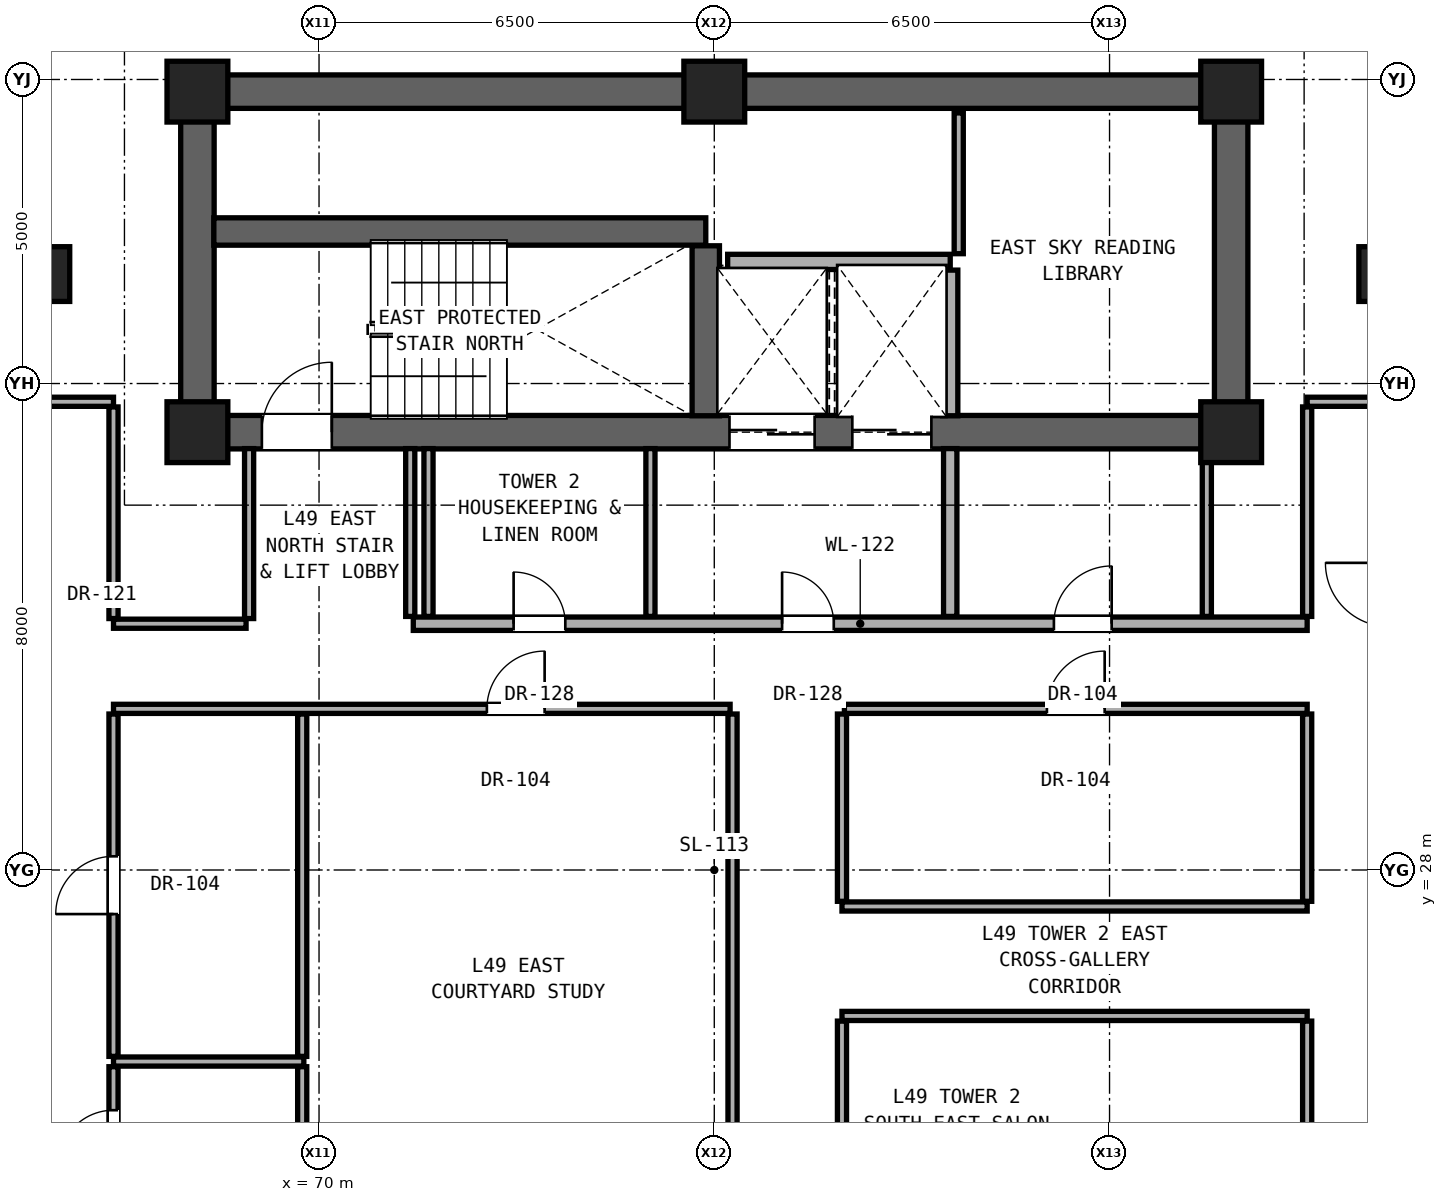
"""IFC4 building model, lengths in metres.
Left out: names, types, materials, properties, quantities, classifications, styles, units other than length and angle.
Written with IfcOpenShell. Run it as: python <this file> out.ifc"""

import sys

from ifc_helpers import new_model, si_unit, direction, frame, frame_2d, origin, origin_2d, place, context, subcontext, project, spatial, rectangle, extrude, element, fill, save


model = new_model("IFC4")
c1 = context("Model", 3, precision=1e-05, world=origin(), true_north=direction((0.0, 1.0)))
c2 = subcontext(c1, "Body", "Model", "MODEL_VIEW")
j1 = project(units=[si_unit("LENGTHUNIT", "METRE"), si_unit("PLANEANGLEUNIT", "RADIAN")], contexts=[c1])
p1 = place(None, origin())
s1 = spatial("IfcSite", under=j1, at=p1, CompositionType="ELEMENT")
p2 = place(p1, origin())
s2 = spatial("IfcBuilding", under=s1, at=p2, CompositionType="ELEMENT")
p3 = place(p2, frame((0.0, 0.0, 173.9)))
s3 = spatial("IfcBuildingStorey", under=s2, at=p3, CompositionType="ELEMENT", Elevation=173.9)
for number, where, z_axis, x_axis in (
    (1, (68.0, 35.2, 0.0), (0.0, 0.0, 1.0), (1.0, 0.0, 0.0)),
    (2, (85.0, 35.2, 0.0), (0.0, 0.0, 1.0), (1.0, 0.0, 0.0)),
    (3, (68.0, 40.8, 0.0), (0.0, 0.0, 1.0), (1.0, 0.0, 0.0)),
    (4, (76.5, 40.8, 0.0), (0.0, 0.0, 1.0), (1.0, 0.0, 0.0)),
    (5, (85.0, 40.8, 0.0), (0.0, 0.0, 1.0), (1.0, 0.0, 0.0)),
):
    element("IfcColumn", number, at=place(p3, frame(where, z_axis=z_axis, x_axis=x_axis)), inside=s3, PredefinedType="COLUMN", context=c2, shape_type="SweptSolid", body=[
        extrude(rectangle(XDim=1.0, YDim=1.0, at=origin_2d()), origin(), (0.0, 0.0, 1.0), 3.25),
    ])
for number, where, z_axis, x_axis in (
    (6, (65.6, 37.8, 0.0), (0.0, 0.0, 1.0), (1.0, 0.0, 0.0)),
    (7, (87.4, 37.8, 0.0), (0.0, 0.0, 1.0), (1.0, 0.0, 0.0)),
):
    element("IfcColumn", number, at=place(p3, frame(where, z_axis=z_axis, x_axis=x_axis)), inside=s3, PredefinedType="PILASTER", context=c2, shape_type="SweptSolid", body=[
        extrude(rectangle(XDim=0.6, YDim=0.9, at=origin_2d()), origin(), (0.0, 0.0, 1.0), 3.25),
    ])
p4 = place(p3, frame((68.0, 40.8, 0.0), z_axis=(0.0, 0.0, 1.0), x_axis=(1.0, 0.0, 0.0)))
e8 = element("IfcWall", 8, at=p4, inside=s3, PredefinedType="SHEAR", context=c2, shape_type="SweptSolid", body=[
    extrude(rectangle(XDim=17.0, YDim=0.55, at=frame_2d((8.5, 0.0))), origin(), (0.0, 0.0, 1.0), 3.05),
])
for number, where, z_axis, x_axis in (
    (9, (68.0, 35.2, 0.0), (0.0, 0.0, 1.0), (0.0, 1.0, 0.0)),
    (10, (85.0, 35.2, 0.0), (0.0, 0.0, 1.0), (0.0, 1.0, 0.0)),
):
    element("IfcWall", number, at=place(p3, frame(where, z_axis=z_axis, x_axis=x_axis)), inside=s3, PredefinedType="SHEAR", context=c2, shape_type="SweptSolid", body=[
        extrude(rectangle(XDim=5.6, YDim=0.55, at=frame_2d((2.8, 0.0))), origin(), (0.0, 0.0, 1.0), 3.05),
    ])
p5 = place(p3, frame((68.0, 35.2, 0.0), z_axis=(0.0, 0.0, 1.0), x_axis=(1.0, 0.0, 0.0)))
e11 = element("IfcWall", 11, at=p5, inside=s3, PredefinedType="SHEAR", context=c2, shape_type="SweptSolid", body=[
    extrude(rectangle(XDim=17.0, YDim=0.55, at=frame_2d((8.5, 0.0))), origin(), (0.0, 0.0, 1.0), 3.05),
])
p6 = place(p5, frame((1.06, 0.0, 0.0)))
e12 = element("IfcOpeningElement", 12, at=p6, cuts=e11, PredefinedType="OPENING", context=c2, shape_type="SweptSolid", body=[
    extrude(rectangle(XDim=1.15, YDim=2.2, at=frame_2d((0.575, 1.1))), frame((0.0, 0.285, 0.0), z_axis=(0.0, -1.0, 0.0), x_axis=(1.0, 0.0, 0.0)), (0.0, 0.0, 1.0), 0.57),
])
p7 = place(p5, frame((8.75, 0.0, 0.0)))
e13 = element("IfcOpeningElement", 13, at=p7, cuts=e11, PredefinedType="OPENING", context=c2, shape_type="SweptSolid", body=[
    extrude(rectangle(XDim=1.4, YDim=2.35, at=frame_2d((0.7, 1.175))), frame((0.0, 0.285, 0.0), z_axis=(0.0, -1.0, 0.0), x_axis=(1.0, 0.0, 0.0)), (0.0, 0.0, 1.0), 0.57),
])
p8 = place(p5, frame((10.77, 0.0, 0.0)))
e14 = element("IfcOpeningElement", 14, at=p8, cuts=e11, PredefinedType="OPENING", context=c2, shape_type="SweptSolid", body=[
    extrude(rectangle(XDim=1.3, YDim=2.3, at=frame_2d((0.65, 1.15))), frame((0.0, 0.285, 0.0), z_axis=(0.0, -1.0, 0.0), x_axis=(1.0, 0.0, 0.0)), (0.0, 0.0, 1.0), 0.57),
])
p9 = place(p3, frame((66.62, 24.85, 0.0), z_axis=(0.0, 0.0, 1.0), x_axis=(1.0, 0.0, 0.0)))
e15 = element("IfcWall", 15, at=p9, inside=s3, PredefinedType="PARTITIONING", context=c2, shape_type="SweptSolid", body=[
    extrude(rectangle(XDim=3.13, YDim=0.15, at=frame_2d((1.565, 0.0))), origin(), (0.0, 0.0, 1.0), 2.186),
])
for number, where, z_axis, x_axis in (
    (16, (78.6, 25.6, 0.0), (0.0, 0.0, 1.0), (1.0, 0.0, 0.0)),
    (17, (78.6, 27.4, 0.0), (0.0, 0.0, 1.0), (1.0, 0.0, 0.0)),
):
    element("IfcWall", number, at=place(p3, frame(where, z_axis=z_axis, x_axis=x_axis)), inside=s3, PredefinedType="PARTITIONING", context=c2, shape_type="SweptSolid", body=[
        extrude(rectangle(XDim=7.65, YDim=0.15, at=frame_2d((3.825, 0.0))), origin(), (0.0, 0.0, 1.0), 2.186),
    ])
p10 = place(p3, frame((66.62, 30.65, 0.0), z_axis=(0.0, 0.0, 1.0), x_axis=(1.0, 0.0, 0.0)))
e18 = element("IfcWall", 18, at=p10, inside=s3, PredefinedType="PARTITIONING", context=c2, shape_type="SweptSolid", body=[
    extrude(rectangle(XDim=10.14, YDim=0.15, at=frame_2d((5.07, 0.0))), origin(), (0.0, 0.0, 1.0), 2.186),
])
p11 = place(p10, frame((6.14, 0.0, 0.0)))
e19 = element("IfcOpeningElement", 19, at=p11, cuts=e18, PredefinedType="OPENING", context=c2, shape_type="SweptSolid", body=[
    extrude(rectangle(XDim=0.95, YDim=2.15, at=frame_2d((0.475, 1.075))), frame((0.0, 0.085, 0.0), z_axis=(0.0, -1.0, 0.0), x_axis=(1.0, 0.0, 0.0)), (0.0, 0.0, 1.0), 0.17),
])
p12 = place(p3, frame((78.64, 30.65, 0.0), z_axis=(0.0, 0.0, 1.0), x_axis=(1.0, 0.0, 0.0)))
e20 = element("IfcWall", 20, at=p12, inside=s3, PredefinedType="PARTITIONING", context=c2, shape_type="SweptSolid", body=[
    extrude(rectangle(XDim=7.61, YDim=0.15, at=frame_2d((3.805, 0.0))), origin(), (0.0, 0.0, 1.0), 2.186),
])
p13 = place(p12, frame((3.33, 0.0, 0.0)))
e21 = element("IfcOpeningElement", 21, at=p13, cuts=e20, PredefinedType="OPENING", context=c2, shape_type="SweptSolid", body=[
    extrude(rectangle(XDim=0.95, YDim=2.15, at=frame_2d((0.475, 1.075))), frame((0.0, 0.085, 0.0), z_axis=(0.0, -1.0, 0.0), x_axis=(1.0, 0.0, 0.0)), (0.0, 0.0, 1.0), 0.17),
])
p14 = place(p3, frame((66.62, 32.05, 0.0), z_axis=(0.0, 0.0, 1.0), x_axis=(1.0, 0.0, 0.0)))
e22 = element("IfcWall", 22, at=p14, inside=s3, PredefinedType="PARTITIONING", context=c2, shape_type="SweptSolid", body=[
    extrude(rectangle(XDim=2.18, YDim=0.15, at=frame_2d((1.09, 0.0))), origin(), (0.0, 0.0, 1.0), 2.186),
])
p15 = place(p3, frame((71.55, 32.05, 0.0), z_axis=(0.0, 0.0, 1.0), x_axis=(1.0, 0.0, 0.0)))
e23 = element("IfcWall", 23, at=p15, inside=s3, PredefinedType="SOLIDWALL", context=c2, shape_type="SweptSolid", body=[
    extrude(rectangle(XDim=14.7, YDim=0.22, at=frame_2d((7.35, 0.0))), origin(), (0.0, 0.0, 1.0), 2.186),
])
p16 = place(p15, frame((6.065, 0.0, 0.0)))
e24 = element("IfcOpeningElement", 24, at=p16, cuts=e23, PredefinedType="OPENING", context=c2, shape_type="SweptSolid", body=[
    extrude(rectangle(XDim=0.85, YDim=2.01, at=frame_2d((0.425, 1.005))), frame((0.0, 0.12, 0.0), z_axis=(0.0, -1.0, 0.0), x_axis=(1.0, 0.0, 0.0)), (0.0, 0.0, 1.0), 0.24),
])
p17 = place(p15, frame((10.535, 0.0, 0.0)))
e25 = element("IfcOpeningElement", 25, at=p17, cuts=e23, PredefinedType="OPENING", context=c2, shape_type="SweptSolid", body=[
    extrude(rectangle(XDim=0.95, YDim=2.15, at=frame_2d((0.475, 1.075))), frame((0.0, 0.12, 0.0), z_axis=(0.0, -1.0, 0.0), x_axis=(1.0, 0.0, 0.0)), (0.0, 0.0, 1.0), 0.24),
])
p18 = place(p15, frame((1.65, 0.0, 0.0)))
e26 = element("IfcOpeningElement", 26, at=p18, cuts=e23, PredefinedType="OPENING", context=c2, shape_type="SweptSolid", body=[
    extrude(rectangle(XDim=0.85, YDim=2.01, at=frame_2d((0.425, 1.005))), frame((0.0, 0.12, 0.0), z_axis=(0.0, -1.0, 0.0), x_axis=(1.0, 0.0, 0.0)), (0.0, 0.0, 1.0), 0.24),
])
p19 = place(p3, frame((65.25, 35.7, 0.0), z_axis=(0.0, 0.0, 1.0), x_axis=(1.0, 0.0, 0.0)))
e27 = element("IfcWall", 27, at=p19, inside=s3, PredefinedType="PARTITIONING", context=c2, shape_type="SweptSolid", body=[
    extrude(rectangle(XDim=1.37, YDim=0.15, at=frame_2d((0.685, 0.0))), origin(), (0.0, 0.0, 1.0), 3.05),
])
p20 = place(p3, frame((86.25, 35.7, 0.0), z_axis=(0.0, 0.0, 1.0), x_axis=(1.0, 0.0, 0.0)))
e28 = element("IfcWall", 28, at=p20, inside=s3, PredefinedType="PARTITIONING", context=c2, shape_type="SweptSolid", body=[
    extrude(rectangle(XDim=1.35, YDim=0.15, at=frame_2d((0.675, 0.0))), origin(), (0.0, 0.0, 1.0), 3.05),
])
p21 = place(p3, frame((76.72, 38.0, 0.0), z_axis=(0.0, 0.0, 1.0), x_axis=(1.0, 0.0, 0.0)))
e29 = element("IfcWall", 29, at=p21, inside=s3, PredefinedType="SOLIDWALL", context=c2, shape_type="SweptSolid", body=[
    extrude(rectangle(XDim=3.66, YDim=0.25, at=frame_2d((1.83, 0.0))), origin(), (0.0, 0.0, 1.0), 3.05),
])
p22 = place(p3, frame((68.27, 38.5, 0.0), z_axis=(0.0, 0.0, 1.0), x_axis=(1.0, 0.0, 0.0)))
e30 = element("IfcWall", 30, at=p22, inside=s3, PredefinedType="SHEAR", context=c2, shape_type="SweptSolid", body=[
    extrude(rectangle(XDim=8.09, YDim=0.45, at=frame_2d((4.045, 0.0))), origin(), (0.0, 0.0, 1.0), 3.05),
])
p23 = place(p3, frame((66.62, 22.435, 0.0), z_axis=(0.0, 0.0, 1.0), x_axis=(0.0, 1.0, 0.0)))
e31 = element("IfcWall", 31, at=p23, inside=s3, PredefinedType="PARTITIONING", context=c2, shape_type="SweptSolid", body=[
    extrude(rectangle(XDim=2.33, YDim=0.15, at=frame_2d((1.165, 0.0))), origin(), (0.0, 0.0, 1.0), 3.05),
])
p24 = place(p23, frame((0.715, 0.0, 0.0)))
e32 = element("IfcOpeningElement", 32, at=p24, cuts=e31, PredefinedType="OPENING", context=c2, shape_type="SweptSolid", body=[
    extrude(rectangle(XDim=0.9, YDim=2.1, at=frame_2d((0.45, 1.05))), frame((0.0, 0.085, 0.0), z_axis=(0.0, -1.0, 0.0), x_axis=(1.0, 0.0, 0.0)), (0.0, 0.0, 1.0), 0.17),
])
p25 = place(p3, frame((66.62, 24.935, 0.0), z_axis=(0.0, 0.0, 1.0), x_axis=(0.0, 1.0, 0.0)))
e33 = element("IfcWall", 33, at=p25, inside=s3, PredefinedType="PARTITIONING", context=c2, shape_type="SweptSolid", body=[
    extrude(rectangle(XDim=5.63, YDim=0.15, at=frame_2d((2.815, 0.0))), origin(), (0.0, 0.0, 1.0), 2.346),
])
p26 = place(p25, frame((2.34, 0.0, 0.0)))
e34 = element("IfcOpeningElement", 34, at=p26, cuts=e33, PredefinedType="OPENING", context=c2, shape_type="SweptSolid", body=[
    extrude(rectangle(XDim=0.95, YDim=2.15, at=frame_2d((0.475, 1.075))), frame((0.0, 0.085, 0.0), z_axis=(0.0, -1.0, 0.0), x_axis=(1.0, 0.0, 0.0)), (0.0, 0.0, 1.0), 0.17),
])
p27 = place(p3, frame((66.62, 32.135, 0.0), z_axis=(0.0, 0.0, 1.0), x_axis=(0.0, 1.0, 0.0)))
e35 = element("IfcWall", 35, at=p27, inside=s3, PredefinedType="PARTITIONING", context=c2, shape_type="SweptSolid", body=[
    extrude(rectangle(XDim=3.48, YDim=0.15, at=frame_2d((1.74, 0.0))), origin(), (0.0, 0.0, 1.0), 2.442),
])
p28 = place(p3, frame((68.85, 32.135, 0.0), z_axis=(0.0, 0.0, 1.0), x_axis=(0.0, 1.0, 0.0)))
e36 = element("IfcWall", 36, at=p28, inside=s3, PredefinedType="PARTITIONING", context=c2, shape_type="SweptSolid", body=[
    extrude(rectangle(XDim=2.795, YDim=0.15, at=frame_2d((1.397, 0.0))), origin(), (0.0, 0.0, 1.0), 3.05),
])
p29 = place(p3, frame((69.723, 22.435, 0.0), z_axis=(0.0, 0.0, 1.0), x_axis=(0.0, 1.0, 0.0)))
e37 = element("IfcWall", 37, at=p29, inside=s3, PredefinedType="PARTITIONING", context=c2, shape_type="SweptSolid", body=[
    extrude(rectangle(XDim=2.33, YDim=0.15, at=frame_2d((1.165, 0.0))), origin(), (0.0, 0.0, 1.0), 3.05),
])
p30 = place(p3, frame((69.723, 24.935, 0.0), z_axis=(0.0, 0.0, 1.0), x_axis=(0.0, 1.0, 0.0)))
e38 = element("IfcWall", 38, at=p30, inside=s3, PredefinedType="PARTITIONING", context=c2, shape_type="SweptSolid", body=[
    extrude(rectangle(XDim=5.63, YDim=0.15, at=frame_2d((2.815, 0.0))), origin(), (0.0, 0.0, 1.0), 2.186),
])
for number, where, z_axis, x_axis in (
    (39, (71.5, 32.17, 0.0), (0.0, 0.0, 1.0), (0.0, 1.0, 0.0)),
    (40, (71.8, 32.17, 0.0), (0.0, 0.0, 1.0), (0.0, 1.0, 0.0)),
    (41, (75.45, 32.17, 0.0), (0.0, 0.0, 1.0), (0.0, 1.0, 0.0)),
):
    element("IfcWall", number, at=place(p3, frame(where, z_axis=z_axis, x_axis=x_axis)), inside=s3, PredefinedType="PARTITIONING", context=c2, shape_type="SweptSolid", body=[
        extrude(rectangle(XDim=2.76, YDim=0.15, at=frame_2d((1.38, 0.0))), origin(), (0.0, 0.0, 1.0), 3.05),
    ])
p31 = place(p3, frame((76.36, 35.47, 0.0), z_axis=(0.0, 0.0, 1.0), x_axis=(0.0, 1.0, 0.0)))
e42 = element("IfcWall", 42, at=p31, inside=s3, PredefinedType="SHEAR", context=c2, shape_type="SweptSolid", body=[
    extrude(rectangle(XDim=2.795, YDim=0.45, at=frame_2d((1.397, 0.0))), origin(), (0.0, 0.0, 1.0), 3.05),
])
p32 = place(p3, frame((76.8, 22.435, 0.0), z_axis=(0.0, 0.0, 1.0), x_axis=(0.0, 1.0, 0.0)))
e43 = element("IfcWall", 43, at=p32, inside=s3, PredefinedType="PARTITIONING", context=c2, shape_type="SweptSolid", body=[
    extrude(rectangle(XDim=8.13, YDim=0.15, at=frame_2d((4.065, 0.0))), origin(), (0.0, 0.0, 1.0), 2.186),
])
p33 = place(p3, frame((78.6, 22.435, 0.0), z_axis=(0.0, 0.0, 1.0), x_axis=(0.0, 1.0, 0.0)))
e44 = element("IfcWall", 44, at=p33, inside=s3, PredefinedType="PARTITIONING", context=c2, shape_type="SweptSolid", body=[
    extrude(rectangle(XDim=3.08, YDim=0.15, at=frame_2d((1.54, 0.0))), origin(), (0.0, 0.0, 1.0), 3.05),
])
p34 = place(p3, frame((78.6, 27.485, 0.0), z_axis=(0.0, 0.0, 1.0), x_axis=(0.0, 1.0, 0.0)))
e45 = element("IfcWall", 45, at=p34, inside=s3, PredefinedType="PARTITIONING", context=c2, shape_type="SweptSolid", body=[
    extrude(rectangle(XDim=3.08, YDim=0.15, at=frame_2d((1.54, 0.0))), origin(), (0.0, 0.0, 1.0), 2.186),
])
p35 = place(p3, frame((80.38, 32.17, 0.0), z_axis=(0.0, 0.0, 1.0), x_axis=(0.0, 1.0, 0.0)))
e46 = element("IfcWall", 46, at=p35, inside=s3, PredefinedType="SOLIDWALL", context=c2, shape_type="SweptSolid", body=[
    extrude(rectangle(XDim=2.76, YDim=0.22, at=frame_2d((1.38, 0.0))), origin(), (0.0, 0.0, 1.0), 3.05),
])
p36 = place(p3, frame((80.38, 35.47, 0.0), z_axis=(0.0, 0.0, 1.0), x_axis=(0.0, 1.0, 0.0)))
e47 = element("IfcWall", 47, at=p36, inside=s3, PredefinedType="SOLIDWALL", context=c2, shape_type="SweptSolid", body=[
    extrude(rectangle(XDim=2.395, YDim=0.25, at=frame_2d((1.198, 0.0))), origin(), (0.0, 0.0, 1.0), 3.05),
])
p37 = place(p3, frame((80.52, 38.135, 0.0), z_axis=(0.0, 0.0, 1.0), x_axis=(0.0, 1.0, 0.0)))
e48 = element("IfcWall", 48, at=p37, inside=s3, PredefinedType="PARTITIONING", context=c2, shape_type="SweptSolid", body=[
    extrude(rectangle(XDim=2.315, YDim=0.15, at=frame_2d((1.157, 0.0))), origin(), (0.0, 0.0, 1.0), 3.05),
])
p38 = place(p3, frame((84.6, 32.17, 0.0), z_axis=(0.0, 0.0, 1.0), x_axis=(0.0, 1.0, 0.0)))
e49 = element("IfcWall", 49, at=p38, inside=s3, PredefinedType="PARTITIONING", context=c2, shape_type="SweptSolid", body=[
    extrude(rectangle(XDim=2.76, YDim=0.15, at=frame_2d((1.38, 0.0))), origin(), (0.0, 0.0, 1.0), 3.05),
])
p39 = place(p3, frame((86.25, 22.435, 0.0), z_axis=(0.0, 0.0, 1.0), x_axis=(0.0, 1.0, 0.0)))
e50 = element("IfcWall", 50, at=p39, inside=s3, PredefinedType="PARTITIONING", context=c2, shape_type="SweptSolid", body=[
    extrude(rectangle(XDim=3.08, YDim=0.15, at=frame_2d((1.54, 0.0))), origin(), (0.0, 0.0, 1.0), 3.05),
])
p40 = place(p3, frame((86.25, 27.485, 0.0), z_axis=(0.0, 0.0, 1.0), x_axis=(0.0, 1.0, 0.0)))
e51 = element("IfcWall", 51, at=p40, inside=s3, PredefinedType="PARTITIONING", context=c2, shape_type="SweptSolid", body=[
    extrude(rectangle(XDim=3.08, YDim=0.15, at=frame_2d((1.54, 0.0))), origin(), (0.0, 0.0, 1.0), 2.346),
])
p41 = place(p3, frame((86.25, 32.17, 0.0), z_axis=(0.0, 0.0, 1.0), x_axis=(0.0, 1.0, 0.0)))
e52 = element("IfcWall", 52, at=p41, inside=s3, PredefinedType="PARTITIONING", context=c2, shape_type="SweptSolid", body=[
    extrude(rectangle(XDim=3.445, YDim=0.15, at=frame_2d((1.723, 0.0))), origin(), (0.0, 0.0, 1.0), 2.442),
])
p42 = place(p6, origin())
e53 = element("IfcDoor", 53, at=p42, inside=s3, OperationType="SINGLE_SWING_RIGHT", PredefinedType="DOOR", context=c2, shape_type="SweptSolid", body=[
    extrude(rectangle(XDim=1.15, YDim=2.2, at=frame_2d((0.575, 1.1))), frame((0.0, 0.025, 0.0), z_axis=(0.0, -1.0, 0.0), x_axis=(1.0, 0.0, 0.0)), (0.0, 0.0, 1.0), 0.05),
])
fill(e12, e53)
p43 = place(p16, origin())
e54 = element("IfcDoor", 54, at=p43, inside=s3, OperationType="SINGLE_SWING_LEFT", PredefinedType="DOOR", context=c2, shape_type="SweptSolid", body=[
    extrude(rectangle(XDim=0.85, YDim=2.01, at=frame_2d((0.425, 1.005))), frame((0.0, 0.025, 0.0), z_axis=(0.0, -1.0, 0.0), x_axis=(1.0, 0.0, 0.0)), (0.0, 0.0, 1.0), 0.05),
])
fill(e24, e54)
p44 = place(p17, origin())
e55 = element("IfcDoor", 55, at=p44, inside=s3, OperationType="SINGLE_SWING_RIGHT", PredefinedType="DOOR", context=c2, shape_type="SweptSolid", body=[
    extrude(rectangle(XDim=0.95, YDim=2.15, at=frame_2d((0.475, 1.075))), frame((0.0, 0.025, 0.0), z_axis=(0.0, -1.0, 0.0), x_axis=(1.0, 0.0, 0.0)), (0.0, 0.0, 1.0), 0.05),
])
fill(e25, e55)
p45 = place(p18, origin())
e56 = element("IfcDoor", 56, at=p45, inside=s3, OperationType="SINGLE_SWING_LEFT", PredefinedType="DOOR", context=c2, shape_type="SweptSolid", body=[
    extrude(rectangle(XDim=0.85, YDim=2.01, at=frame_2d((0.425, 1.005))), frame((0.0, 0.025, 0.0), z_axis=(0.0, -1.0, 0.0), x_axis=(1.0, 0.0, 0.0)), (0.0, 0.0, 1.0), 0.05),
])
fill(e26, e56)
p46 = place(p24, origin())
e57 = element("IfcDoor", 57, at=p46, inside=s3, OperationType="SINGLE_SWING_LEFT", PredefinedType="DOOR", context=c2, shape_type="SweptSolid", body=[
    extrude(rectangle(XDim=0.9, YDim=2.1, at=frame_2d((0.45, 1.05))), frame((0.0, 0.025, 0.0), z_axis=(0.0, -1.0, 0.0), x_axis=(1.0, 0.0, 0.0)), (0.0, 0.0, 1.0), 0.05),
])
fill(e32, e57)
p47 = place(p26, origin())
e58 = element("IfcDoor", 58, at=p47, inside=s3, OperationType="SINGLE_SWING_LEFT", PredefinedType="DOOR", context=c2, shape_type="SweptSolid", body=[
    extrude(rectangle(XDim=0.95, YDim=2.15, at=frame_2d((0.475, 1.075))), frame((0.0, 0.025, 0.0), z_axis=(0.0, -1.0, 0.0), x_axis=(1.0, 0.0, 0.0)), (0.0, 0.0, 1.0), 0.05),
])
fill(e34, e58)
p48 = place(p11, origin())
e59 = element("IfcDoor", 59, at=p48, inside=s3, OperationType="SINGLE_SWING_RIGHT", PredefinedType="DOOR", context=c2, shape_type="SweptSolid", body=[
    extrude(rectangle(XDim=0.95, YDim=2.15, at=frame_2d((0.475, 1.075))), frame((0.0, 0.025, 0.0), z_axis=(0.0, -1.0, 0.0), x_axis=(1.0, 0.0, 0.0)), (0.0, 0.0, 1.0), 0.05),
])
fill(e19, e59)
p49 = place(p13, origin())
e60 = element("IfcDoor", 60, at=p49, inside=s3, OperationType="SINGLE_SWING_RIGHT", PredefinedType="DOOR", context=c2, shape_type="SweptSolid", body=[
    extrude(rectangle(XDim=0.95, YDim=2.15, at=frame_2d((0.475, 1.075))), frame((0.0, 0.025, 0.0), z_axis=(0.0, -1.0, 0.0), x_axis=(1.0, 0.0, 0.0)), (0.0, 0.0, 1.0), 0.05),
])
fill(e21, e60)
p50 = place(p7, origin())
e61 = element("IfcDoor", 61, at=p50, inside=s3, OperationType="DOUBLE_DOOR_SLIDING", PredefinedType="DOOR", context=c2, shape_type="SweptSolid", body=[
    extrude(rectangle(XDim=1.4, YDim=2.35, at=frame_2d((0.7, 1.175))), frame((0.0, 0.025, 0.0), z_axis=(0.0, -1.0, 0.0), x_axis=(1.0, 0.0, 0.0)), (0.0, 0.0, 1.0), 0.05),
])
fill(e13, e61)
p51 = place(p8, origin())
e62 = element("IfcDoor", 62, at=p51, inside=s3, OperationType="DOUBLE_DOOR_SLIDING", PredefinedType="DOOR", context=c2, shape_type="SweptSolid", body=[
    extrude(rectangle(XDim=1.3, YDim=2.3, at=frame_2d((0.65, 1.15))), frame((0.0, 0.025, 0.0), z_axis=(0.0, -1.0, 0.0), x_axis=(1.0, 0.0, 0.0)), (0.0, 0.0, 1.0), 0.05),
])
fill(e14, e62)
save(model, sys.argv[1])
